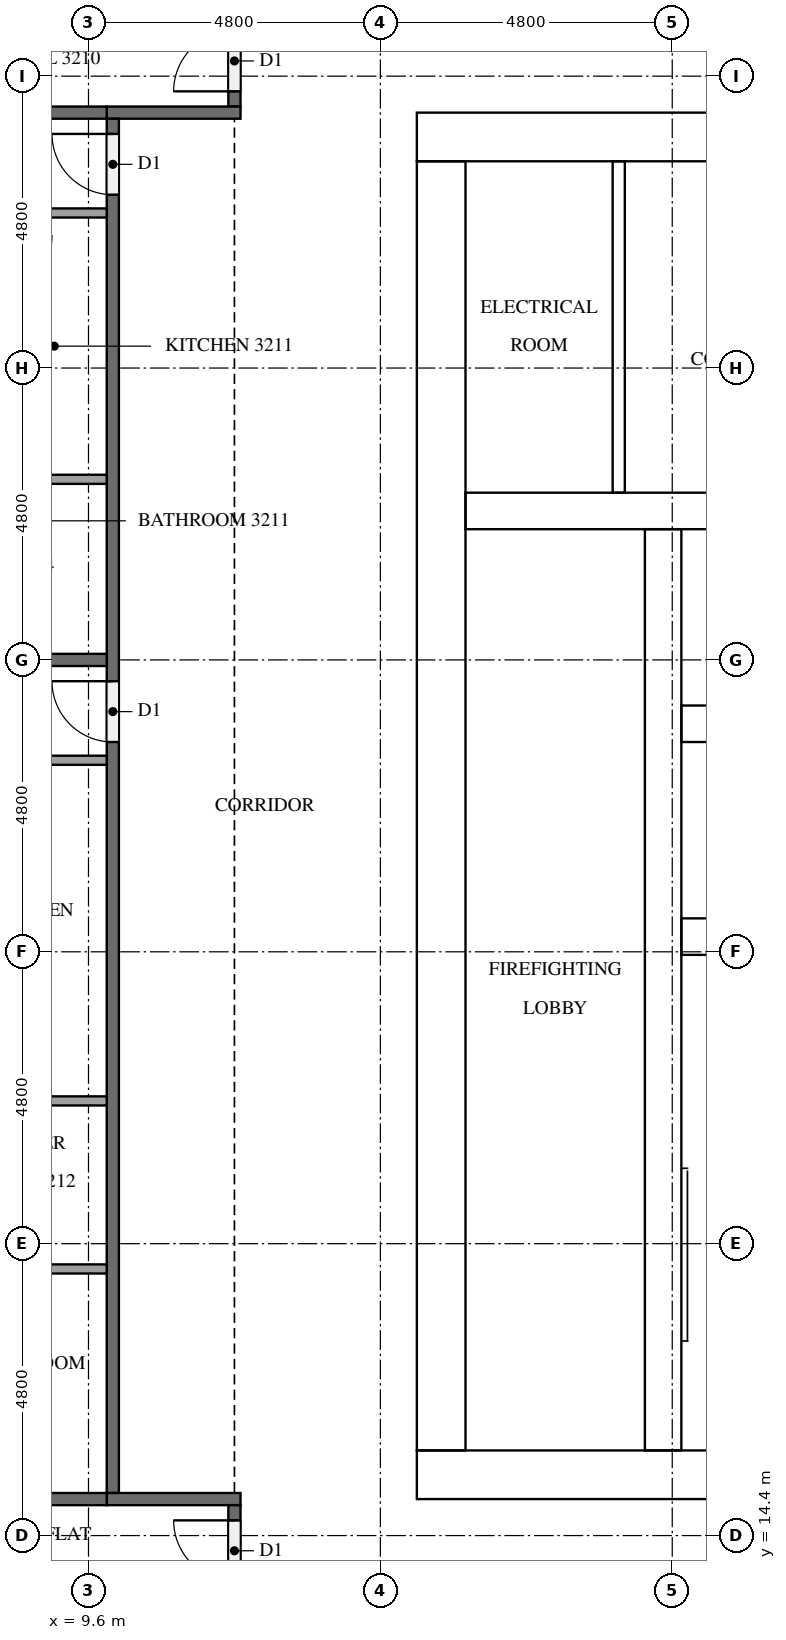
"""IFC4 building model, lengths in metres.
Left out: names, types, materials, properties, quantities, classifications, styles, units other than length and angle.
Written with IfcOpenShell. Run it as: python <this file> out.ifc"""

import sys

from ifc_helpers import new_model, si_unit, direction, frame, frame_2d, origin, place, context, subcontext, project, spatial, rectangle, extrude, element, fill, save


model = new_model("IFC4")
c1 = context("Model", 3, precision=1e-05, world=origin(), true_north=direction((0.0, 1.0)))
c2 = subcontext(c1, "Body", "Model", "MODEL_VIEW")
j1 = project(units=[si_unit("LENGTHUNIT", "METRE"), si_unit("PLANEANGLEUNIT", "RADIAN")], contexts=[c1])
p1 = place(None, origin())
s1 = spatial("IfcSite", under=j1, at=p1, CompositionType="ELEMENT")
p2 = place(p1, origin())
s2 = spatial("IfcBuilding", under=s1, at=p2, CompositionType="ELEMENT")
p3 = place(p2, frame((0.0, 0.0, 126.1)))
s3 = spatial("IfcBuildingStorey", under=s2, at=p3, CompositionType="ELEMENT", Elevation=126.1)
p4 = place(p3, frame((15.0, 15.4, 0.0), z_axis=(0.0, 0.0, 1.0), x_axis=(1.0, 0.0, 0.0)))
e1 = element("IfcWall", 1, at=p4, inside=s3, PredefinedType="SHEAR", context=c2, shape_type="SweptSolid", body=[
    extrude(rectangle(XDim=32.4, YDim=0.8, at=frame_2d((16.2, 0.0))), origin(), (0.0, 0.0, 1.0), 3.2),
])
p5 = place(p4, frame((15.3, 0.0, 0.0)))
e2 = element("IfcOpeningElement", 2, at=p5, cuts=e1, PredefinedType="OPENING", context=c2, shape_type="SweptSolid", body=[
    extrude(rectangle(XDim=1.8, YDim=2.1, at=frame_2d((0.9, 1.05))), frame((0.0, 0.41, 0.0), z_axis=(0.0, -1.0, 0.0), x_axis=(1.0, 0.0, 0.0)), (0.0, 0.0, 1.0), 0.82),
])
p6 = place(p3, frame((15.0, 37.4, 0.0), z_axis=(0.0, 0.0, 1.0), x_axis=(1.0, 0.0, 0.0)))
e3 = element("IfcWall", 3, at=p6, inside=s3, PredefinedType="SHEAR", context=c2, shape_type="SweptSolid", body=[
    extrude(rectangle(XDim=32.4, YDim=0.8, at=frame_2d((16.2, 0.0))), origin(), (0.0, 0.0, 1.0), 3.2),
])
p7 = place(p6, frame((15.3, 0.0, 0.0)))
e4 = element("IfcOpeningElement", 4, at=p7, cuts=e3, PredefinedType="OPENING", context=c2, shape_type="SweptSolid", body=[
    extrude(rectangle(XDim=1.8, YDim=2.1, at=frame_2d((0.9, 1.05))), frame((0.0, 0.41, 0.0), z_axis=(0.0, -1.0, 0.0), x_axis=(1.0, 0.0, 0.0)), (0.0, 0.0, 1.0), 0.82),
])
p8 = place(p6, frame((1.51, 0.0, 0.0)))
e5 = element("IfcOpeningElement", 5, at=p8, cuts=e3, PredefinedType="OPENING", context=c2, shape_type="SweptSolid", body=[
    extrude(rectangle(XDim=1.0, YDim=2.1, at=frame_2d((0.5, 1.05))), frame((0.0, 0.41, 0.0), z_axis=(0.0, -1.0, 0.0), x_axis=(1.0, 0.0, 0.0)), (0.0, 0.0, 1.0), 0.82),
])
p9 = place(p6, frame((5.11, 0.0, 0.0)))
e6 = element("IfcOpeningElement", 6, at=p9, cuts=e3, PredefinedType="OPENING", context=c2, shape_type="SweptSolid", body=[
    extrude(rectangle(XDim=1.0, YDim=2.1, at=frame_2d((0.5, 1.05))), frame((0.0, 0.41, 0.0), z_axis=(0.0, -1.0, 0.0), x_axis=(1.0, 0.0, 0.0)), (0.0, 0.0, 1.0), 0.82),
])
p10 = place(p3, frame((15.4, 15.8, 0.0), z_axis=(0.0, 0.0, 1.0), x_axis=(0.0, 1.0, 0.0)))
e7 = element("IfcWall", 7, at=p10, inside=s3, PredefinedType="SHEAR", context=c2, shape_type="SweptSolid", body=[
    extrude(rectangle(XDim=21.2, YDim=0.8, at=frame_2d((10.6, 0.0))), origin(), (0.0, 0.0, 1.0), 3.2),
])
p11 = place(p10, frame((4.96, 0.0, 0.0)))
e8 = element("IfcOpeningElement", 8, at=p11, cuts=e7, PredefinedType="OPENING", context=c2, shape_type="SweptSolid", body=[
    extrude(rectangle(XDim=1.2, YDim=2.1, at=frame_2d((0.6, 1.05))), frame((0.0, 0.41, 0.0), z_axis=(0.0, -1.0, 0.0), x_axis=(1.0, 0.0, 0.0)), (0.0, 0.0, 1.0), 0.82),
])
p12 = place(p3, frame((19.05, 15.8, 0.0), z_axis=(0.0, 0.0, 1.0), x_axis=(0.0, 1.0, 0.0)))
e9 = element("IfcWall", 9, at=p12, inside=s3, PredefinedType="SHEAR", context=c2, shape_type="SweptSolid", body=[
    extrude(rectangle(XDim=15.15, YDim=0.6, at=frame_2d((7.575, 0.0))), origin(), (0.0, 0.0, 1.0), 3.2),
])
p13 = place(p12, frame((9.65, 0.0, 0.0)))
e10 = element("IfcOpeningElement", 10, at=p13, cuts=e9, PredefinedType="OPENING", context=c2, shape_type="SweptSolid", body=[
    extrude(rectangle(XDim=1.1, YDim=2.1, at=frame_2d((0.55, 1.05))), frame((0.0, 0.31, 0.0), z_axis=(0.0, -1.0, 0.0), x_axis=(1.0, 0.0, 0.0)), (0.0, 0.0, 1.0), 0.62),
])
p14 = place(p12, frame((13.15, 0.0, 0.0)))
e11 = element("IfcOpeningElement", 11, at=p14, cuts=e9, PredefinedType="OPENING", context=c2, shape_type="SweptSolid", body=[
    extrude(rectangle(XDim=1.1, YDim=2.1, at=frame_2d((0.55, 1.05))), frame((0.0, 0.31, 0.0), z_axis=(0.0, -1.0, 0.0), x_axis=(1.0, 0.0, 0.0)), (0.0, 0.0, 1.0), 0.62),
])
p15 = place(p12, frame((0.4, 0.0, 0.0)))
e12 = element("IfcOpeningElement", 12, at=p15, cuts=e9, PredefinedType="OPENING", context=c2, shape_type="SweptSolid", body=[
    extrude(rectangle(XDim=1.2, YDim=2.1, at=frame_2d((0.6, 1.05))), frame((0.0, 0.31, 0.0), z_axis=(0.0, -1.0, 0.0), x_axis=(1.0, 0.0, 0.0)), (0.0, 0.0, 1.0), 0.62),
])
for number, where, z_axis, x_axis in (
    (13, (19.35, 24.25, 0.0), (0.0, 0.0, 1.0), (1.0, 0.0, 0.0)),
    (14, (19.35, 27.75, 0.0), (0.0, 0.0, 1.0), (1.0, 0.0, 0.0)),
):
    element("IfcWall", number, at=place(p3, frame(where, z_axis=z_axis, x_axis=x_axis)), inside=s3, PredefinedType="SHEAR", context=c2, shape_type="SweptSolid", body=[
        extrude(rectangle(XDim=3.45, YDim=0.6, at=frame_2d((1.725, 0.0))), origin(), (0.0, 0.0, 1.0), 3.2),
    ])
p16 = place(p3, frame((15.8, 31.25, 0.0), z_axis=(0.0, 0.0, 1.0), x_axis=(1.0, 0.0, 0.0)))
e15 = element("IfcWall", 15, at=p16, inside=s3, PredefinedType="SHEAR", context=c2, shape_type="SweptSolid", body=[
    extrude(rectangle(XDim=7.0, YDim=0.6, at=frame_2d((3.5, 0.0))), origin(), (0.0, 0.0, 1.0), 3.2),
])
p17 = place(p3, frame((18.32, 31.55, 0.0), z_axis=(0.0, 0.0, 1.0), x_axis=(0.0, 1.0, 0.0)))
e16 = element("IfcWall", 16, at=p17, inside=s3, PredefinedType="PARTITIONING", context=c2, shape_type="SweptSolid", body=[
    extrude(rectangle(XDim=5.45, YDim=0.2, at=frame_2d((2.725, 0.0))), origin(), (0.0, 0.0, 1.0), 3.2),
])
p18 = place(p3, frame((12.0, 37.9, 0.0), z_axis=(0.0, 0.0, 1.0), x_axis=(0.0, 1.0, 0.0)))
e17 = element("IfcWall", 17, at=p18, inside=s3, PredefinedType="PARTITIONING", context=c2, shape_type="SweptSolid", body=[
    extrude(rectangle(XDim=2.8, YDim=0.2, at=frame_2d((1.4, 0.0))), origin(), (0.0, 0.0, 1.0), 3.2),
])
p19 = place(p18, frame((0.25, 0.0, 0.0)))
e18 = element("IfcOpeningElement", 18, at=p19, cuts=e17, PredefinedType="OPENING", context=c2, shape_type="SweptSolid", body=[
    extrude(rectangle(XDim=1.0, YDim=2.1, at=frame_2d((0.5, 1.05))), frame((0.0, 0.11, 0.0), z_axis=(0.0, -1.0, 0.0), x_axis=(1.0, 0.0, 0.0)), (0.0, 0.0, 1.0), 0.22),
])
p20 = place(p3, frame((12.1, 37.8, 0.0), z_axis=(0.0, 0.0, 1.0), x_axis=(-1.0, 0.0, 0.0)))
e19 = element("IfcWall", 19, at=p20, inside=s3, PredefinedType="PARTITIONING", context=c2, shape_type="SweptSolid", body=[
    extrude(rectangle(XDim=2.2, YDim=0.2, at=frame_2d((1.1, 0.0))), origin(), (0.0, 0.0, 1.0), 3.2),
])
p21 = place(p3, frame((10.0, 15.1, 0.0), z_axis=(0.0, 0.0, 1.0), x_axis=(0.0, 1.0, 0.0)))
e20 = element("IfcWall", 20, at=p21, inside=s3, PredefinedType="PARTITIONING", context=c2, shape_type="SweptSolid", body=[
    extrude(rectangle(XDim=22.6, YDim=0.2, at=frame_2d((11.3, 0.0))), origin(), (0.0, 0.0, 1.0), 3.2),
])
p22 = place(p21, frame((21.35, 0.0, 0.0)))
e21 = element("IfcOpeningElement", 21, at=p22, cuts=e20, PredefinedType="OPENING", context=c2, shape_type="SweptSolid", body=[
    extrude(rectangle(XDim=1.0, YDim=2.1, at=frame_2d((0.5, 1.05))), frame((0.0, 0.11, 0.0), z_axis=(0.0, -1.0, 0.0), x_axis=(1.0, 0.0, 0.0)), (0.0, 0.0, 1.0), 0.22),
])
p23 = place(p21, frame((12.35, 0.0, 0.0)))
e22 = element("IfcOpeningElement", 22, at=p23, cuts=e20, PredefinedType="OPENING", context=c2, shape_type="SweptSolid", body=[
    extrude(rectangle(XDim=1.0, YDim=2.1, at=frame_2d((0.5, 1.05))), frame((0.0, 0.11, 0.0), z_axis=(0.0, -1.0, 0.0), x_axis=(1.0, 0.0, 0.0)), (0.0, 0.0, 1.0), 0.22),
])
p24 = place(p3, frame((9.9, 15.0, 0.0), z_axis=(0.0, 0.0, 1.0), x_axis=(1.0, 0.0, 0.0)))
e23 = element("IfcWall", 23, at=p24, inside=s3, PredefinedType="PARTITIONING", context=c2, shape_type="SweptSolid", body=[
    extrude(rectangle(XDim=2.2, YDim=0.2, at=frame_2d((1.1, 0.0))), origin(), (0.0, 0.0, 1.0), 3.2),
])
p25 = place(p3, frame((12.0, 12.1, 0.0), z_axis=(0.0, 0.0, 1.0), x_axis=(0.0, 1.0, 0.0)))
e24 = element("IfcWall", 24, at=p25, inside=s3, PredefinedType="PARTITIONING", context=c2, shape_type="SweptSolid", body=[
    extrude(rectangle(XDim=2.8, YDim=0.2, at=frame_2d((1.4, 0.0))), origin(), (0.0, 0.0, 1.0), 3.2),
])
p26 = place(p25, frame((1.55, 0.0, 0.0)))
e25 = element("IfcOpeningElement", 25, at=p26, cuts=e24, PredefinedType="OPENING", context=c2, shape_type="SweptSolid", body=[
    extrude(rectangle(XDim=1.0, YDim=2.1, at=frame_2d((0.5, 1.05))), frame((0.0, 0.11, 0.0), z_axis=(0.0, -1.0, 0.0), x_axis=(1.0, 0.0, 0.0)), (0.0, 0.0, 1.0), 0.22),
])
for number, where, z_axis, x_axis in (
    (26, (0.375, 37.8, 0.0), (0.0, 0.0, 1.0), (1.0, 0.0, 0.0)),
    (27, (0.375, 28.8, 0.0), (0.0, 0.0, 1.0), (1.0, 0.0, 0.0)),
):
    element("IfcWall", number, at=place(p3, frame(where, z_axis=z_axis, x_axis=x_axis)), inside=s3, PredefinedType="PARTITIONING", context=c2, shape_type="SweptSolid", body=[
        extrude(rectangle(XDim=9.525, YDim=0.2, at=frame_2d((4.762, 0.0))), origin(), (0.0, 0.0, 1.0), 3.2),
    ])
p27 = place(p3, frame((0.1, 15.0, 0.0), z_axis=(0.0, 0.0, 1.0), x_axis=(1.0, 0.0, 0.0)))
e28 = element("IfcWall", 28, at=p27, inside=s3, PredefinedType="PARTITIONING", context=c2, shape_type="SweptSolid", body=[
    extrude(rectangle(XDim=9.8, YDim=0.2, at=frame_2d((4.9, 0.0))), origin(), (0.0, 0.0, 1.0), 3.2),
])
p28 = place(p3, frame((9.9, 31.77, 0.0), z_axis=(0.0, 0.0, 1.0), x_axis=(-1.0, 0.0, 0.0)))
e29 = element("IfcWall", 29, at=p28, inside=s3, PredefinedType="PARTITIONING", context=c2, shape_type="SweptSolid", body=[
    extrude(rectangle(XDim=1.725, YDim=0.15, at=frame_2d((0.862, 0.0))), origin(), (0.0, 0.0, 1.0), 3.2),
])
p29 = place(p3, frame((9.9, 36.15, 0.0), z_axis=(0.0, 0.0, 1.0), x_axis=(-1.0, 0.0, 0.0)))
e30 = element("IfcWall", 30, at=p29, inside=s3, PredefinedType="PARTITIONING", context=c2, shape_type="SweptSolid", body=[
    extrude(rectangle(XDim=1.875, YDim=0.15, at=frame_2d((0.938, 0.0))), origin(), (0.0, 0.0, 1.0), 3.2),
])
for number, where, z_axis, x_axis in (
    (31, (9.9, 21.548, 0.0), (0.0, 0.0, 1.0), (-1.0, 0.0, 0.0)),
    (32, (9.9, 18.785, 0.0), (0.0, 0.0, 1.0), (-1.0, 0.0, 0.0)),
):
    element("IfcWall", number, at=place(p3, frame(where, z_axis=z_axis, x_axis=x_axis)), inside=s3, PredefinedType="PARTITIONING", context=c2, shape_type="SweptSolid", body=[
        extrude(rectangle(XDim=2.475, YDim=0.15, at=frame_2d((1.237, 0.0))), origin(), (0.0, 0.0, 1.0), 3.2),
    ])
p30 = place(p3, frame((9.9, 27.15, 0.0), z_axis=(0.0, 0.0, 1.0), x_axis=(-1.0, 0.0, 0.0)))
e33 = element("IfcWall", 33, at=p30, inside=s3, PredefinedType="PARTITIONING", context=c2, shape_type="SweptSolid", body=[
    extrude(rectangle(XDim=2.625, YDim=0.15, at=frame_2d((1.312, 0.0))), origin(), (0.0, 0.0, 1.0), 3.2),
])
p31 = place(p13, origin())
e34 = element("IfcDoor", 34, at=p31, inside=s3, OperationType="DOUBLE_DOOR_SLIDING", PredefinedType="DOOR", context=c2, shape_type="SweptSolid", body=[
    extrude(rectangle(XDim=1.1, YDim=2.1, at=frame_2d((0.55, 1.05))), frame((0.0, 0.025, 0.0), z_axis=(0.0, -1.0, 0.0), x_axis=(1.0, 0.0, 0.0)), (0.0, 0.0, 1.0), 0.05),
])
fill(e10, e34)
p32 = place(p14, origin())
e35 = element("IfcDoor", 35, at=p32, inside=s3, OperationType="DOUBLE_DOOR_SLIDING", PredefinedType="DOOR", context=c2, shape_type="SweptSolid", body=[
    extrude(rectangle(XDim=1.1, YDim=2.1, at=frame_2d((0.55, 1.05))), frame((0.0, 0.025, 0.0), z_axis=(0.0, -1.0, 0.0), x_axis=(1.0, 0.0, 0.0)), (0.0, 0.0, 1.0), 0.05),
])
fill(e11, e35)
p33 = place(p15, frame((1.2, 0.0, 0.0), z_axis=(0.0, 0.0, 1.0), x_axis=(-1.0, 0.0, 0.0)))
e36 = element("IfcDoor", 36, at=p33, inside=s3, OperationType="SINGLE_SWING_RIGHT", PredefinedType="DOOR", context=c2, shape_type="SweptSolid", body=[
    extrude(rectangle(XDim=1.2, YDim=2.1, at=frame_2d((0.6, 1.05))), frame((0.0, 0.025, 0.0), z_axis=(0.0, -1.0, 0.0), x_axis=(1.0, 0.0, 0.0)), (0.0, 0.0, 1.0), 0.05),
])
fill(e12, e36)
p34 = place(p11, frame((1.2, 0.0, 0.0), z_axis=(0.0, 0.0, 1.0), x_axis=(-1.0, 0.0, 0.0)))
e37 = element("IfcDoor", 37, at=p34, inside=s3, OperationType="SINGLE_SWING_LEFT", PredefinedType="DOOR", context=c2, shape_type="SweptSolid", body=[
    extrude(rectangle(XDim=1.2, YDim=2.1, at=frame_2d((0.6, 1.05))), frame((0.0, 0.025, 0.0), z_axis=(0.0, -1.0, 0.0), x_axis=(1.0, 0.0, 0.0)), (0.0, 0.0, 1.0), 0.05),
])
fill(e8, e37)
p35 = place(p8, origin())
e38 = element("IfcDoor", 38, at=p35, inside=s3, OperationType="SINGLE_SWING_LEFT", PredefinedType="DOOR", context=c2, shape_type="SweptSolid", body=[
    extrude(rectangle(XDim=1.0, YDim=2.1, at=frame_2d((0.5, 1.05))), frame((0.0, 0.025, 0.0), z_axis=(0.0, -1.0, 0.0), x_axis=(1.0, 0.0, 0.0)), (0.0, 0.0, 1.0), 0.05),
])
fill(e5, e38)
p36 = place(p19, origin())
e39 = element("IfcDoor", 39, at=p36, inside=s3, OperationType="SINGLE_SWING_LEFT", PredefinedType="DOOR", context=c2, shape_type="SweptSolid", body=[
    extrude(rectangle(XDim=1.0, YDim=2.1, at=frame_2d((0.5, 1.05))), frame((0.0, 0.025, 0.0), z_axis=(0.0, -1.0, 0.0), x_axis=(1.0, 0.0, 0.0)), (0.0, 0.0, 1.0), 0.05),
])
fill(e18, e39)
p37 = place(p22, origin())
e40 = element("IfcDoor", 40, at=p37, inside=s3, OperationType="SINGLE_SWING_RIGHT", PredefinedType="DOOR", context=c2, shape_type="SweptSolid", body=[
    extrude(rectangle(XDim=1.0, YDim=2.1, at=frame_2d((0.5, 1.05))), frame((0.0, 0.025, 0.0), z_axis=(0.0, -1.0, 0.0), x_axis=(1.0, 0.0, 0.0)), (0.0, 0.0, 1.0), 0.05),
])
fill(e21, e40)
p38 = place(p23, origin())
e41 = element("IfcDoor", 41, at=p38, inside=s3, OperationType="SINGLE_SWING_RIGHT", PredefinedType="DOOR", context=c2, shape_type="SweptSolid", body=[
    extrude(rectangle(XDim=1.0, YDim=2.1, at=frame_2d((0.5, 1.05))), frame((0.0, 0.025, 0.0), z_axis=(0.0, -1.0, 0.0), x_axis=(1.0, 0.0, 0.0)), (0.0, 0.0, 1.0), 0.05),
])
fill(e22, e41)
p39 = place(p26, origin())
e42 = element("IfcDoor", 42, at=p39, inside=s3, OperationType="SINGLE_SWING_RIGHT", PredefinedType="DOOR", context=c2, shape_type="SweptSolid", body=[
    extrude(rectangle(XDim=1.0, YDim=2.1, at=frame_2d((0.5, 1.05))), frame((0.0, 0.025, 0.0), z_axis=(0.0, -1.0, 0.0), x_axis=(1.0, 0.0, 0.0)), (0.0, 0.0, 1.0), 0.05),
])
fill(e25, e42)
save(model, sys.argv[1])
